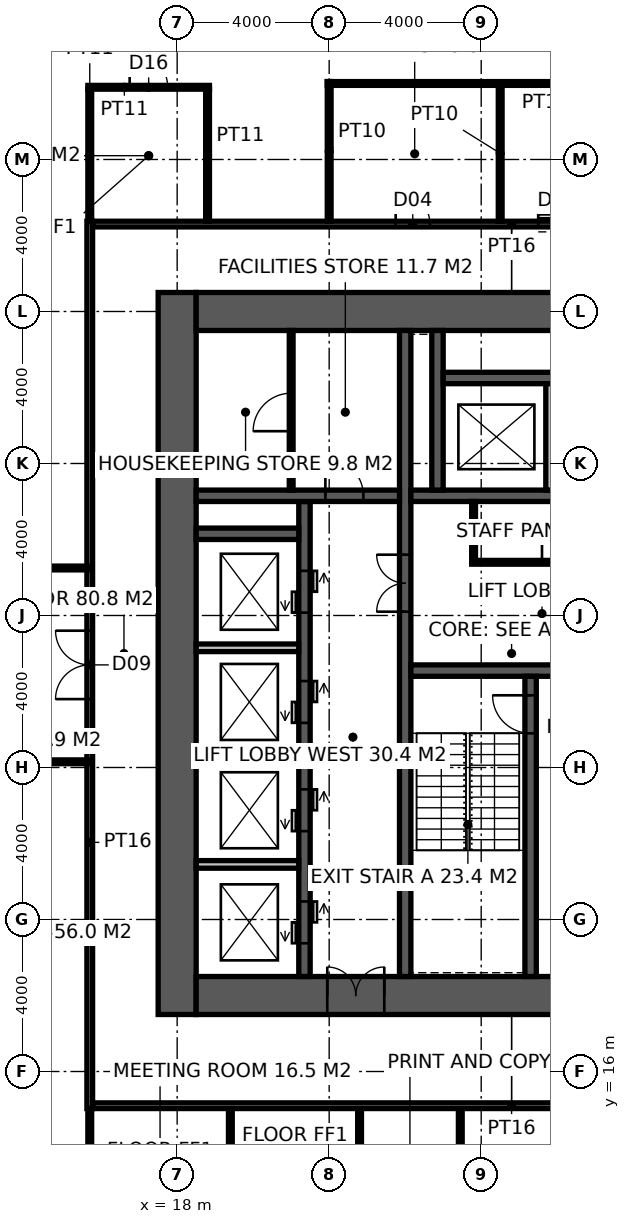
"""IFC4 building model, lengths in metres.
Left out: names, types, materials, properties, quantities, classifications, styles, units other than length and angle.
Written with IfcOpenShell. Run it as: python <this file> out.ifc"""

import sys

from ifc_helpers import new_model, si_unit, direction, frame, frame_2d, origin, place, context, subcontext, project, spatial, rectangle, extrude, element, fill, save


model = new_model("IFC4")
c1 = context("Model", 3, precision=1e-05, world=origin(), true_north=direction((0.0, 1.0)))
c2 = subcontext(c1, "Body", "Model", "MODEL_VIEW")
j1 = project(units=[si_unit("LENGTHUNIT", "METRE"), si_unit("PLANEANGLEUNIT", "RADIAN")], contexts=[c1])
p1 = place(None, origin())
s1 = spatial("IfcSite", under=j1, at=p1, CompositionType="ELEMENT")
p2 = place(p1, origin())
s2 = spatial("IfcBuilding", under=s1, at=p2, CompositionType="ELEMENT")
p3 = place(p2, frame((0.0, 0.0, 81.4)))
s3 = spatial("IfcBuildingStorey", under=s2, at=p3, CompositionType="ELEMENT", Elevation=81.4)
p4 = place(p3, frame((18.0, 17.5, -0.15), z_axis=(0.0, 0.0, 1.0), x_axis=(0.0, 1.0, 0.0)))
e1 = element("IfcWall", 1, at=p4, inside=s3, PredefinedType="SHEAR", context=c2, shape_type="SweptSolid", body=[
    extrude(rectangle(XDim=19.0, YDim=1.0, at=frame_2d((9.5, 0.0))), origin(), (0.0, 0.0, 1.0), 4.0),
])
p5 = place(p3, frame((18.5, 18.0, -0.15), z_axis=(0.0, 0.0, 1.0), x_axis=(1.0, 0.0, 0.0)))
e2 = element("IfcWall", 2, at=p5, inside=s3, PredefinedType="SHEAR", context=c2, shape_type="SweptSolid", body=[
    extrude(rectangle(XDim=17.6, YDim=1.0, at=frame_2d((8.8, 0.0))), origin(), (0.0, 0.0, 1.0), 4.0),
])
p6 = place(p5, frame((3.45, 0.0, 0.15)))
e3 = element("IfcOpeningElement", 3, at=p6, cuts=e2, PredefinedType="OPENING", context=c2, shape_type="SweptSolid", body=[
    extrude(rectangle(XDim=1.5, YDim=2.4, at=frame_2d((0.75, 1.2))), frame((0.0, 0.51, 0.0), z_axis=(0.0, -1.0, 0.0), x_axis=(1.0, 0.0, 0.0)), (0.0, 0.0, 1.0), 1.02),
])
p7 = place(p3, frame((18.5, 36.0, -0.15), z_axis=(0.0, 0.0, 1.0), x_axis=(1.0, 0.0, 0.0)))
e4 = element("IfcWall", 4, at=p7, inside=s3, PredefinedType="SHEAR", context=c2, shape_type="SweptSolid", body=[
    extrude(rectangle(XDim=17.6, YDim=1.0, at=frame_2d((8.8, 0.0))), origin(), (0.0, 0.0, 1.0), 4.0),
])
p8 = place(p3, frame((24.0, 18.5, -0.15), z_axis=(0.0, 0.0, 1.0), x_axis=(0.0, 1.0, 0.0)))
e5 = element("IfcWall", 5, at=p8, inside=s3, PredefinedType="SHEAR", context=c2, shape_type="SweptSolid", body=[
    extrude(rectangle(XDim=17.0, YDim=0.3, at=frame_2d((8.5, 0.0))), origin(), (0.0, 0.0, 1.0), 4.0),
])
p9 = place(p8, frame((9.6, 0.0, 0.15)))
e6 = element("IfcOpeningElement", 6, at=p9, cuts=e5, PredefinedType="OPENING", context=c2, shape_type="SweptSolid", body=[
    extrude(rectangle(XDim=1.5, YDim=2.4, at=frame_2d((0.75, 1.2))), frame((0.0, 0.16, 0.0), z_axis=(0.0, -1.0, 0.0), x_axis=(1.0, 0.0, 0.0)), (0.0, 0.0, 1.0), 0.32),
])
p10 = place(p3, frame((24.15, 26.55, -0.15), z_axis=(0.0, 0.0, 1.0), x_axis=(1.0, 0.0, 0.0)))
e7 = element("IfcWall", 7, at=p10, inside=s3, PredefinedType="SHEAR", context=c2, shape_type="SweptSolid", body=[
    extrude(rectangle(XDim=11.25, YDim=0.3, at=frame_2d((5.625, 0.0))), origin(), (0.0, 0.0, 1.0), 4.0),
])
p11 = place(p10, frame((9.25, 0.0, 0.15)))
e8 = element("IfcOpeningElement", 8, at=p11, cuts=e7, PredefinedType="OPENING", context=c2, shape_type="SweptSolid", body=[
    extrude(rectangle(XDim=1.0, YDim=2.2, at=frame_2d((0.5, 1.1))), frame((0.0, 0.16, 0.0), z_axis=(0.0, -1.0, 0.0), x_axis=(1.0, 0.0, 0.0)), (0.0, 0.0, 1.0), 0.32),
])
p12 = place(p10, frame((4.9, 0.0, 0.15)))
e9 = element("IfcOpeningElement", 9, at=p12, cuts=e7, PredefinedType="OPENING", context=c2, shape_type="SweptSolid", body=[
    extrude(rectangle(XDim=1.5, YDim=2.4, at=frame_2d((0.75, 1.2))), frame((0.0, 0.16, 0.0), z_axis=(0.0, -1.0, 0.0), x_axis=(1.0, 0.0, 0.0)), (0.0, 0.0, 1.0), 0.32),
])
p13 = place(p3, frame((27.3, 18.5, -0.15), z_axis=(0.0, 0.0, 1.0), x_axis=(0.0, 1.0, 0.0)))
e10 = element("IfcWall", 10, at=p13, inside=s3, PredefinedType="SHEAR", context=c2, shape_type="SweptSolid", body=[
    extrude(rectangle(XDim=7.9, YDim=0.3, at=frame_2d((3.95, 0.0))), origin(), (0.0, 0.0, 1.0), 4.0),
])
p14 = place(p13, frame((6.4, 0.0, 0.15)))
e11 = element("IfcOpeningElement", 11, at=p14, cuts=e10, PredefinedType="OPENING", context=c2, shape_type="SweptSolid", body=[
    extrude(rectangle(XDim=1.0, YDim=2.2, at=frame_2d((0.5, 1.1))), frame((0.0, 0.16, 0.0), z_axis=(0.0, -1.0, 0.0), x_axis=(1.0, 0.0, 0.0)), (0.0, 0.0, 1.0), 0.32),
])
p15 = place(p3, frame((24.15, 31.15, -0.15), z_axis=(0.0, 0.0, 1.0), x_axis=(1.0, 0.0, 0.0)))
e12 = element("IfcWall", 12, at=p15, inside=s3, PredefinedType="SHEAR", context=c2, shape_type="SweptSolid", body=[
    extrude(rectangle(XDim=11.25, YDim=0.3, at=frame_2d((5.625, 0.0))), origin(), (0.0, 0.0, 1.0), 4.0),
])
p16 = place(p15, frame((7.25, 0.0, 0.15)))
e13 = element("IfcOpeningElement", 13, at=p16, cuts=e12, PredefinedType="OPENING", context=c2, shape_type="SweptSolid", body=[
    extrude(rectangle(XDim=1.4, YDim=2.4, at=frame_2d((0.7, 1.2))), frame((0.0, 0.16, 0.0), z_axis=(0.0, -1.0, 0.0), x_axis=(1.0, 0.0, 0.0)), (0.0, 0.0, 1.0), 0.32),
])
p17 = place(p3, frame((21.35, 18.5, -0.15), z_axis=(0.0, 0.0, 1.0), x_axis=(0.0, 1.0, 0.0)))
e14 = element("IfcWall", 14, at=p17, inside=s3, PredefinedType="SHEAR", context=c2, shape_type="SweptSolid", body=[
    extrude(rectangle(XDim=12.5, YDim=0.3, at=frame_2d((6.25, 0.0))), origin(), (0.0, 0.0, 1.0), 4.0),
])
p18 = place(p17, frame((0.875, 0.0, 0.15)))
e15 = element("IfcOpeningElement", 15, at=p18, cuts=e14, PredefinedType="OPENING", context=c2, shape_type="SweptSolid", body=[
    extrude(rectangle(XDim=1.1, YDim=2.2, at=frame_2d((0.55, 1.1))), frame((0.0, 0.16, 0.0), z_axis=(0.0, -1.0, 0.0), x_axis=(1.0, 0.0, 0.0)), (0.0, 0.0, 1.0), 0.32),
])
p19 = place(p17, frame((3.825, 0.0, 0.15)))
e16 = element("IfcOpeningElement", 16, at=p19, cuts=e14, PredefinedType="OPENING", context=c2, shape_type="SweptSolid", body=[
    extrude(rectangle(XDim=1.1, YDim=2.2, at=frame_2d((0.55, 1.1))), frame((0.0, 0.16, 0.0), z_axis=(0.0, -1.0, 0.0), x_axis=(1.0, 0.0, 0.0)), (0.0, 0.0, 1.0), 0.32),
])
p20 = place(p17, frame((6.675, 0.0, 0.15)))
e17 = element("IfcOpeningElement", 17, at=p20, cuts=e14, PredefinedType="OPENING", context=c2, shape_type="SweptSolid", body=[
    extrude(rectangle(XDim=1.1, YDim=2.2, at=frame_2d((0.55, 1.1))), frame((0.0, 0.16, 0.0), z_axis=(0.0, -1.0, 0.0), x_axis=(1.0, 0.0, 0.0)), (0.0, 0.0, 1.0), 0.32),
])
p21 = place(p17, frame((9.575, 0.0, 0.15)))
e18 = element("IfcOpeningElement", 18, at=p21, cuts=e14, PredefinedType="OPENING", context=c2, shape_type="SweptSolid", body=[
    extrude(rectangle(XDim=1.1, YDim=2.2, at=frame_2d((0.55, 1.1))), frame((0.0, 0.16, 0.0), z_axis=(0.0, -1.0, 0.0), x_axis=(1.0, 0.0, 0.0)), (0.0, 0.0, 1.0), 0.32),
])
p22 = place(p3, frame((18.5, 31.15, -0.15), z_axis=(0.0, 0.0, 1.0), x_axis=(1.0, 0.0, 0.0)))
e19 = element("IfcWall", 19, at=p22, inside=s3, PredefinedType="SHEAR", context=c2, shape_type="SweptSolid", body=[
    extrude(rectangle(XDim=5.35, YDim=0.3, at=frame_2d((2.675, 0.0))), origin(), (0.0, 0.0, 1.0), 4.0),
])
p23 = place(p22, frame((3.4, 0.0, 0.15)))
e20 = element("IfcOpeningElement", 20, at=p23, cuts=e19, PredefinedType="OPENING", context=c2, shape_type="SweptSolid", body=[
    extrude(rectangle(XDim=1.0, YDim=2.2, at=frame_2d((0.5, 1.1))), frame((0.0, 0.16, 0.0), z_axis=(0.0, -1.0, 0.0), x_axis=(1.0, 0.0, 0.0)), (0.0, 0.0, 1.0), 0.32),
])
p24 = place(p3, frame((18.5, 30.15, -0.15), z_axis=(0.0, 0.0, 1.0), x_axis=(1.0, 0.0, 0.0)))
e21 = element("IfcWall", 21, at=p24, inside=s3, PredefinedType="SHEAR", context=c2, shape_type="SweptSolid", body=[
    extrude(rectangle(XDim=2.7, YDim=0.3, at=frame_2d((1.35, 0.0))), origin(), (0.0, 0.0, 1.0), 4.0),
])
p25 = place(p3, frame((24.85, 31.3, -0.15), z_axis=(0.0, 0.0, 1.0), x_axis=(0.0, 1.0, 0.0)))
e22 = element("IfcWall", 22, at=p25, inside=s3, PredefinedType="SHEAR", context=c2, shape_type="SweptSolid", body=[
    extrude(rectangle(XDim=4.2, YDim=0.3, at=frame_2d((2.1, 0.0))), origin(), (0.0, 0.0, 1.0), 4.0),
])
p26 = place(p3, frame((25.0, 34.25, -0.15), z_axis=(0.0, 0.0, 1.0), x_axis=(1.0, 0.0, 0.0)))
e23 = element("IfcWall", 23, at=p26, inside=s3, PredefinedType="SHEAR", context=c2, shape_type="SweptSolid", body=[
    extrude(rectangle(XDim=8.6, YDim=0.3, at=frame_2d((4.3, 0.0))), origin(), (0.0, 0.0, 1.0), 4.0),
])
p27 = place(p3, frame((27.8, 31.3, -0.15), z_axis=(0.0, 0.0, 1.0), x_axis=(0.0, 1.0, 0.0)))
e24 = element("IfcWall", 24, at=p27, inside=s3, PredefinedType="SOLIDWALL", context=c2, shape_type="SweptSolid", body=[
    extrude(rectangle(XDim=2.8, YDim=0.2, at=frame_2d((1.4, 0.0))), origin(), (0.0, 0.0, 1.0), 4.0),
])
for number, where, z_axis, x_axis in (
    (25, (18.5, 21.45, -0.15), (0.0, 0.0, 1.0), (1.0, 0.0, 0.0)),
    (26, (18.5, 24.3, -0.15), (0.0, 0.0, 1.0), (1.0, 0.0, 0.0)),
    (27, (18.5, 27.15, -0.15), (0.0, 0.0, 1.0), (1.0, 0.0, 0.0)),
):
    element("IfcWall", number, at=place(p3, frame(where, z_axis=z_axis, x_axis=x_axis)), inside=s3, PredefinedType="SOLIDWALL", context=c2, shape_type="SweptSolid", body=[
        extrude(rectangle(XDim=2.7, YDim=0.2, at=frame_2d((1.35, 0.0))), origin(), (0.0, 0.0, 1.0), 4.0),
    ])
p28 = place(p3, frame((21.0, 31.3, 0.0), z_axis=(0.0, 0.0, 1.0), x_axis=(0.0, 1.0, 0.0)))
e28 = element("IfcWall", 28, at=p28, inside=s3, PredefinedType="PARTITIONING", context=c2, shape_type="SweptSolid", body=[
    extrude(rectangle(XDim=4.2, YDim=0.1, at=frame_2d((2.1, 0.0))), origin(), (0.0, 0.0, 1.0), 3.85),
])
p29 = place(p28, frame((1.55, 0.0, 0.0)))
e29 = element("IfcOpeningElement", 29, at=p29, cuts=e28, PredefinedType="OPENING", context=c2, shape_type="SweptSolid", body=[
    extrude(rectangle(XDim=1.0, YDim=2.2, at=frame_2d((0.5, 1.1))), frame((0.0, 0.06, 0.0), z_axis=(0.0, -1.0, 0.0), x_axis=(1.0, 0.0, 0.0)), (0.0, 0.0, 1.0), 0.12),
])
p30 = place(p3, frame((25.75, 29.4, 0.0), z_axis=(0.0, 0.0, 1.0), x_axis=(1.0, 0.0, 0.0)))
e30 = element("IfcWall", 30, at=p30, inside=s3, PredefinedType="PARTITIONING", context=c2, shape_type="SweptSolid", body=[
    extrude(rectangle(XDim=4.7, YDim=0.1, at=frame_2d((2.35, 0.0))), origin(), (0.0, 0.0, 1.0), 3.85),
])
p31 = place(p30, frame((1.85, 0.0, 0.0)))
e31 = element("IfcOpeningElement", 31, at=p31, cuts=e30, PredefinedType="OPENING", context=c2, shape_type="SweptSolid", body=[
    extrude(rectangle(XDim=1.0, YDim=2.2, at=frame_2d((0.5, 1.1))), frame((0.0, 0.06, 0.0), z_axis=(0.0, -1.0, 0.0), x_axis=(1.0, 0.0, 0.0)), (0.0, 0.0, 1.0), 0.12),
])
p32 = place(p3, frame((25.8, 29.45, 0.0), z_axis=(0.0, 0.0, 1.0), x_axis=(0.0, 1.0, 0.0)))
e32 = element("IfcWall", 32, at=p32, inside=s3, PredefinedType="PARTITIONING", context=c2, shape_type="SweptSolid", body=[
    extrude(rectangle(XDim=1.55, YDim=0.1, at=frame_2d((0.775, 0.0))), origin(), (0.0, 0.0, 1.0), 3.85),
])
p33 = place(p3, frame((15.7, 15.025, 0.0), z_axis=(0.0, 0.0, 1.0), x_axis=(0.0, 1.0, 0.0)))
e33 = element("IfcWall", 33, at=p33, inside=s3, PredefinedType="PARTITIONING", context=c2, shape_type="SweptSolid", body=[
    extrude(rectangle(XDim=23.35, YDim=0.15, at=frame_2d((11.675, 0.0))), origin(), (0.0, 0.0, 1.0), 3.85),
])
p34 = place(p33, frame((10.775, 0.0, 0.0)))
e34 = element("IfcOpeningElement", 34, at=p34, cuts=e33, PredefinedType="OPENING", context=c2, shape_type="SweptSolid", body=[
    extrude(rectangle(XDim=1.8, YDim=2.4, at=frame_2d((0.9, 1.2))), frame((0.0, 0.085, 0.0), z_axis=(0.0, -1.0, 0.0), x_axis=(1.0, 0.0, 0.0)), (0.0, 0.0, 1.0), 0.17),
])
p35 = place(p3, frame((15.775, 15.1, 0.0), z_axis=(0.0, 0.0, 1.0), x_axis=(1.0, 0.0, 0.0)))
e35 = element("IfcWall", 35, at=p35, inside=s3, PredefinedType="PARTITIONING", context=c2, shape_type="SweptSolid", body=[
    extrude(rectangle(XDim=22.05, YDim=0.15, at=frame_2d((11.025, 0.0))), origin(), (0.0, 0.0, 1.0), 3.85),
])
p36 = place(p3, frame((15.775, 38.3, 0.0), z_axis=(0.0, 0.0, 1.0), x_axis=(1.0, 0.0, 0.0)))
e36 = element("IfcWall", 36, at=p36, inside=s3, PredefinedType="PARTITIONING", context=c2, shape_type="SweptSolid", body=[
    extrude(rectangle(XDim=22.05, YDim=0.15, at=frame_2d((11.025, 0.0))), origin(), (0.0, 0.0, 1.0), 3.85),
])
p37 = place(p36, frame((7.975, 0.0, 0.0)))
e37 = element("IfcOpeningElement", 37, at=p37, cuts=e36, PredefinedType="OPENING", context=c2, shape_type="SweptSolid", body=[
    extrude(rectangle(XDim=0.9, YDim=2.1, at=frame_2d((0.45, 1.05))), frame((0.0, 0.085, 0.0), z_axis=(0.0, -1.0, 0.0), x_axis=(1.0, 0.0, 0.0)), (0.0, 0.0, 1.0), 0.17),
])
p38 = place(p36, frame((11.725, 0.0, 0.0)))
e38 = element("IfcOpeningElement", 38, at=p38, cuts=e36, PredefinedType="OPENING", context=c2, shape_type="SweptSolid", body=[
    extrude(rectangle(XDim=1.0, YDim=2.1, at=frame_2d((0.5, 1.05))), frame((0.0, 0.085, 0.0), z_axis=(0.0, -1.0, 0.0), x_axis=(1.0, 0.0, 0.0)), (0.0, 0.0, 1.0), 0.17),
])
p39 = place(p36, frame((15.575, 0.0, 0.0)))
e39 = element("IfcOpeningElement", 39, at=p39, cuts=e36, PredefinedType="OPENING", context=c2, shape_type="SweptSolid", body=[
    extrude(rectangle(XDim=0.9, YDim=2.1, at=frame_2d((0.45, 1.05))), frame((0.0, 0.085, 0.0), z_axis=(0.0, -1.0, 0.0), x_axis=(1.0, 0.0, 0.0)), (0.0, 0.0, 1.0), 0.17),
])
p40 = place(p3, frame((22.0, 38.375, 0.0), z_axis=(0.0, 0.0, 1.0), x_axis=(0.0, 1.0, 0.0)))
e40 = element("IfcWall", 40, at=p40, inside=s3, PredefinedType="PARTITIONING", context=c2, shape_type="SweptSolid", body=[
    extrude(rectangle(XDim=3.675, YDim=0.1, at=frame_2d((1.837, 0.0))), origin(), (0.0, 0.0, 1.0), 2.95),
])
p41 = place(p3, frame((21.95, 42.0, 0.0), z_axis=(0.0, 0.0, 1.0), x_axis=(1.0, 0.0, 0.0)))
e41 = element("IfcWall", 41, at=p41, inside=s3, PredefinedType="PARTITIONING", context=c2, shape_type="SweptSolid", body=[
    extrude(rectangle(XDim=12.1, YDim=0.1, at=frame_2d((6.05, 0.0))), origin(), (0.0, 0.0, 1.0), 3.85),
])
p42 = place(p3, frame((26.5, 38.375, 0.0), z_axis=(0.0, 0.0, 1.0), x_axis=(0.0, 1.0, 0.0)))
e42 = element("IfcWall", 42, at=p42, inside=s3, PredefinedType="PARTITIONING", context=c2, shape_type="SweptSolid", body=[
    extrude(rectangle(XDim=3.575, YDim=0.1, at=frame_2d((1.788, 0.0))), origin(), (0.0, 0.0, 1.0), 3.85),
])
p43 = place(p3, frame((15.65, 41.9, 0.0), z_axis=(0.0, 0.0, 1.0), x_axis=(1.0, 0.0, 0.0)))
e43 = element("IfcWall", 43, at=p43, inside=s3, PredefinedType="PARTITIONING", context=c2, shape_type="SweptSolid", body=[
    extrude(rectangle(XDim=3.2, YDim=0.1, at=frame_2d((1.6, 0.0))), origin(), (0.0, 0.0, 1.0), 3.85),
])
p44 = place(p43, frame((1.1, 0.0, 0.0)))
e44 = element("IfcOpeningElement", 44, at=p44, cuts=e43, PredefinedType="OPENING", context=c2, shape_type="SweptSolid", body=[
    extrude(rectangle(XDim=1.0, YDim=2.2, at=frame_2d((0.5, 1.1))), frame((0.0, 0.06, 0.0), z_axis=(0.0, -1.0, 0.0), x_axis=(1.0, 0.0, 0.0)), (0.0, 0.0, 1.0), 0.12),
])
p45 = place(p3, frame((15.7, 10.35, 0.0), z_axis=(0.0, 0.0, 1.0), x_axis=(0.0, 1.0, 0.0)))
e45 = element("IfcWall", 45, at=p45, inside=s3, PredefinedType="PARTITIONING", context=c2, shape_type="SweptSolid", body=[
    extrude(rectangle(XDim=4.675, YDim=0.1, at=frame_2d((2.337, 0.0))), origin(), (0.0, 0.0, 1.0), 3.85),
])
for number, where, z_axis, x_axis in (
    (46, (15.7, 38.375, 0.0), (0.0, 0.0, 1.0), (0.0, 1.0, 0.0)),
    (47, (18.8, 38.375, 0.0), (0.0, 0.0, 1.0), (0.0, 1.0, 0.0)),
):
    element("IfcWall", number, at=place(p3, frame(where, z_axis=z_axis, x_axis=x_axis)), inside=s3, PredefinedType="PARTITIONING", context=c2, shape_type="SweptSolid", body=[
        extrude(rectangle(XDim=3.475, YDim=0.1, at=frame_2d((1.738, 0.0))), origin(), (0.0, 0.0, 1.0), 3.85),
    ])
for number, where, z_axis, x_axis in (
    (48, (19.4, 10.35, 0.0), (0.0, 0.0, 1.0), (0.0, 1.0, 0.0)),
    (49, (22.8, 10.35, 0.0), (0.0, 0.0, 1.0), (0.0, 1.0, 0.0)),
    (50, (25.45, 10.35, 0.0), (0.0, 0.0, 1.0), (0.0, 1.0, 0.0)),
):
    element("IfcWall", number, at=place(p3, frame(where, z_axis=z_axis, x_axis=x_axis)), inside=s3, PredefinedType="PARTITIONING", context=c2, shape_type="SweptSolid", body=[
        extrude(rectangle(XDim=4.675, YDim=0.1, at=frame_2d((2.337, 0.0))), origin(), (0.0, 0.0, 1.0), 3.85),
    ])
p46 = place(p3, frame((15.7, 29.25, 0.0), z_axis=(0.0, 0.0, 1.0), x_axis=(-1.0, 0.0, 0.0)))
e51 = element("IfcWall", 51, at=p46, inside=s3, PredefinedType="PARTITIONING", context=c2, shape_type="SweptSolid", body=[
    extrude(rectangle(XDim=4.5, YDim=0.1, at=frame_2d((2.25, 0.0))), origin(), (0.0, 0.0, 1.0), 3.85),
])
p47 = place(p3, frame((11.2, 24.15, 0.0), z_axis=(0.0, 0.0, 1.0), x_axis=(1.0, 0.0, 0.0)))
e52 = element("IfcWall", 52, at=p47, inside=s3, PredefinedType="PARTITIONING", context=c2, shape_type="SweptSolid", body=[
    extrude(rectangle(XDim=4.5, YDim=0.1, at=frame_2d((2.25, 0.0))), origin(), (0.0, 0.0, 1.0), 2.95),
])
p48 = place(p14, origin())
e53 = element("IfcDoor", 53, at=p48, inside=s3, OperationType="SINGLE_SWING_RIGHT", PredefinedType="DOOR", context=c2, shape_type="SweptSolid", body=[
    extrude(rectangle(XDim=1.0, YDim=2.2, at=frame_2d((0.5, 1.1))), frame((0.0, 0.025, 0.0), z_axis=(0.0, -1.0, 0.0), x_axis=(1.0, 0.0, 0.0)), (0.0, 0.0, 1.0), 0.05),
])
fill(e11, e53)
p49 = place(p9, origin())
e54 = element("IfcDoor", 54, at=p49, inside=s3, OperationType="DOUBLE_DOOR_DOUBLE_SWING", PredefinedType="DOOR", context=c2, shape_type="SweptSolid", body=[
    extrude(rectangle(XDim=1.5, YDim=2.4, at=frame_2d((0.75, 1.2))), frame((0.0, 0.025, 0.0), z_axis=(0.0, -1.0, 0.0), x_axis=(1.0, 0.0, 0.0)), (0.0, 0.0, 1.0), 0.05),
])
fill(e6, e54)
p50 = place(p23, origin())
e55 = element("IfcDoor", 55, at=p50, inside=s3, OperationType="SINGLE_SWING_LEFT", PredefinedType="DOOR", context=c2, shape_type="SweptSolid", body=[
    extrude(rectangle(XDim=1.0, YDim=2.2, at=frame_2d((0.5, 1.1))), frame((0.0, 0.025, 0.0), z_axis=(0.0, -1.0, 0.0), x_axis=(1.0, 0.0, 0.0)), (0.0, 0.0, 1.0), 0.05),
])
fill(e20, e55)
p51 = place(p29, origin())
e56 = element("IfcDoor", 56, at=p51, inside=s3, OperationType="SINGLE_SWING_LEFT", PredefinedType="DOOR", context=c2, shape_type="SweptSolid", body=[
    extrude(rectangle(XDim=1.0, YDim=2.2, at=frame_2d((0.5, 1.1))), frame((0.0, 0.025, 0.0), z_axis=(0.0, -1.0, 0.0), x_axis=(1.0, 0.0, 0.0)), (0.0, 0.0, 1.0), 0.05),
])
fill(e29, e56)
p52 = place(p31, origin())
e57 = element("IfcDoor", 57, at=p52, inside=s3, OperationType="SINGLE_SWING_LEFT", PredefinedType="DOOR", context=c2, shape_type="SweptSolid", body=[
    extrude(rectangle(XDim=1.0, YDim=2.2, at=frame_2d((0.5, 1.1))), frame((0.0, 0.025, 0.0), z_axis=(0.0, -1.0, 0.0), x_axis=(1.0, 0.0, 0.0)), (0.0, 0.0, 1.0), 0.05),
])
fill(e31, e57)
p53 = place(p6, origin())
e58 = element("IfcDoor", 58, at=p53, inside=s3, OperationType="DOUBLE_DOOR_DOUBLE_SWING", PredefinedType="DOOR", context=c2, shape_type="SweptSolid", body=[
    extrude(rectangle(XDim=1.5, YDim=2.4, at=frame_2d((0.75, 1.2))), frame((0.0, 0.025, 0.0), z_axis=(0.0, -1.0, 0.0), x_axis=(1.0, 0.0, 0.0)), (0.0, 0.0, 1.0), 0.05),
])
fill(e3, e58)
p54 = place(p37, origin())
e59 = element("IfcDoor", 59, at=p54, inside=s3, OperationType="SINGLE_SWING_LEFT", PredefinedType="DOOR", context=c2, shape_type="SweptSolid", body=[
    extrude(rectangle(XDim=0.9, YDim=2.1, at=frame_2d((0.45, 1.05))), frame((0.0, 0.025, 0.0), z_axis=(0.0, -1.0, 0.0), x_axis=(1.0, 0.0, 0.0)), (0.0, 0.0, 1.0), 0.05),
])
fill(e37, e59)
p55 = place(p38, origin())
e60 = element("IfcDoor", 60, at=p55, inside=s3, OperationType="SLIDING_TO_LEFT", PredefinedType="DOOR", context=c2, shape_type="SweptSolid", body=[
    extrude(rectangle(XDim=1.0, YDim=2.1, at=frame_2d((0.5, 1.05))), frame((0.0, 0.025, 0.0), z_axis=(0.0, -1.0, 0.0), x_axis=(1.0, 0.0, 0.0)), (0.0, 0.0, 1.0), 0.05),
])
fill(e38, e60)
p56 = place(p34, origin())
e61 = element("IfcDoor", 61, at=p56, inside=s3, OperationType="DOUBLE_DOOR_DOUBLE_SWING", PredefinedType="DOOR", context=c2, shape_type="SweptSolid", body=[
    extrude(rectangle(XDim=1.8, YDim=2.4, at=frame_2d((0.9, 1.2))), frame((0.0, 0.025, 0.0), z_axis=(0.0, -1.0, 0.0), x_axis=(1.0, 0.0, 0.0)), (0.0, 0.0, 1.0), 0.05),
])
fill(e34, e61)
p57 = place(p44, origin())
e62 = element("IfcDoor", 62, at=p57, inside=s3, OperationType="SINGLE_SWING_LEFT", PredefinedType="DOOR", context=c2, shape_type="SweptSolid", body=[
    extrude(rectangle(XDim=1.0, YDim=2.2, at=frame_2d((0.5, 1.1))), frame((0.0, 0.025, 0.0), z_axis=(0.0, -1.0, 0.0), x_axis=(1.0, 0.0, 0.0)), (0.0, 0.0, 1.0), 0.05),
])
fill(e44, e62)
p58 = place(p18, origin())
e63 = element("IfcDoor", 63, at=p58, inside=s3, OperationType="DOUBLE_DOOR_SLIDING", PredefinedType="DOOR", context=c2, shape_type="SweptSolid", body=[
    extrude(rectangle(XDim=1.1, YDim=2.2, at=frame_2d((0.55, 1.1))), frame((0.0, 0.025, 0.0), z_axis=(0.0, -1.0, 0.0), x_axis=(1.0, 0.0, 0.0)), (0.0, 0.0, 1.0), 0.05),
])
fill(e15, e63)
p59 = place(p19, origin())
e64 = element("IfcDoor", 64, at=p59, inside=s3, OperationType="DOUBLE_DOOR_SLIDING", PredefinedType="DOOR", context=c2, shape_type="SweptSolid", body=[
    extrude(rectangle(XDim=1.1, YDim=2.2, at=frame_2d((0.55, 1.1))), frame((0.0, 0.025, 0.0), z_axis=(0.0, -1.0, 0.0), x_axis=(1.0, 0.0, 0.0)), (0.0, 0.0, 1.0), 0.05),
])
fill(e16, e64)
p60 = place(p20, origin())
e65 = element("IfcDoor", 65, at=p60, inside=s3, OperationType="DOUBLE_DOOR_SLIDING", PredefinedType="DOOR", context=c2, shape_type="SweptSolid", body=[
    extrude(rectangle(XDim=1.1, YDim=2.2, at=frame_2d((0.55, 1.1))), frame((0.0, 0.025, 0.0), z_axis=(0.0, -1.0, 0.0), x_axis=(1.0, 0.0, 0.0)), (0.0, 0.0, 1.0), 0.05),
])
fill(e17, e65)
p61 = place(p21, origin())
e66 = element("IfcDoor", 66, at=p61, inside=s3, OperationType="DOUBLE_DOOR_SLIDING", PredefinedType="DOOR", context=c2, shape_type="SweptSolid", body=[
    extrude(rectangle(XDim=1.1, YDim=2.2, at=frame_2d((0.55, 1.1))), frame((0.0, 0.025, 0.0), z_axis=(0.0, -1.0, 0.0), x_axis=(1.0, 0.0, 0.0)), (0.0, 0.0, 1.0), 0.05),
])
fill(e18, e66)
save(model, sys.argv[1])
